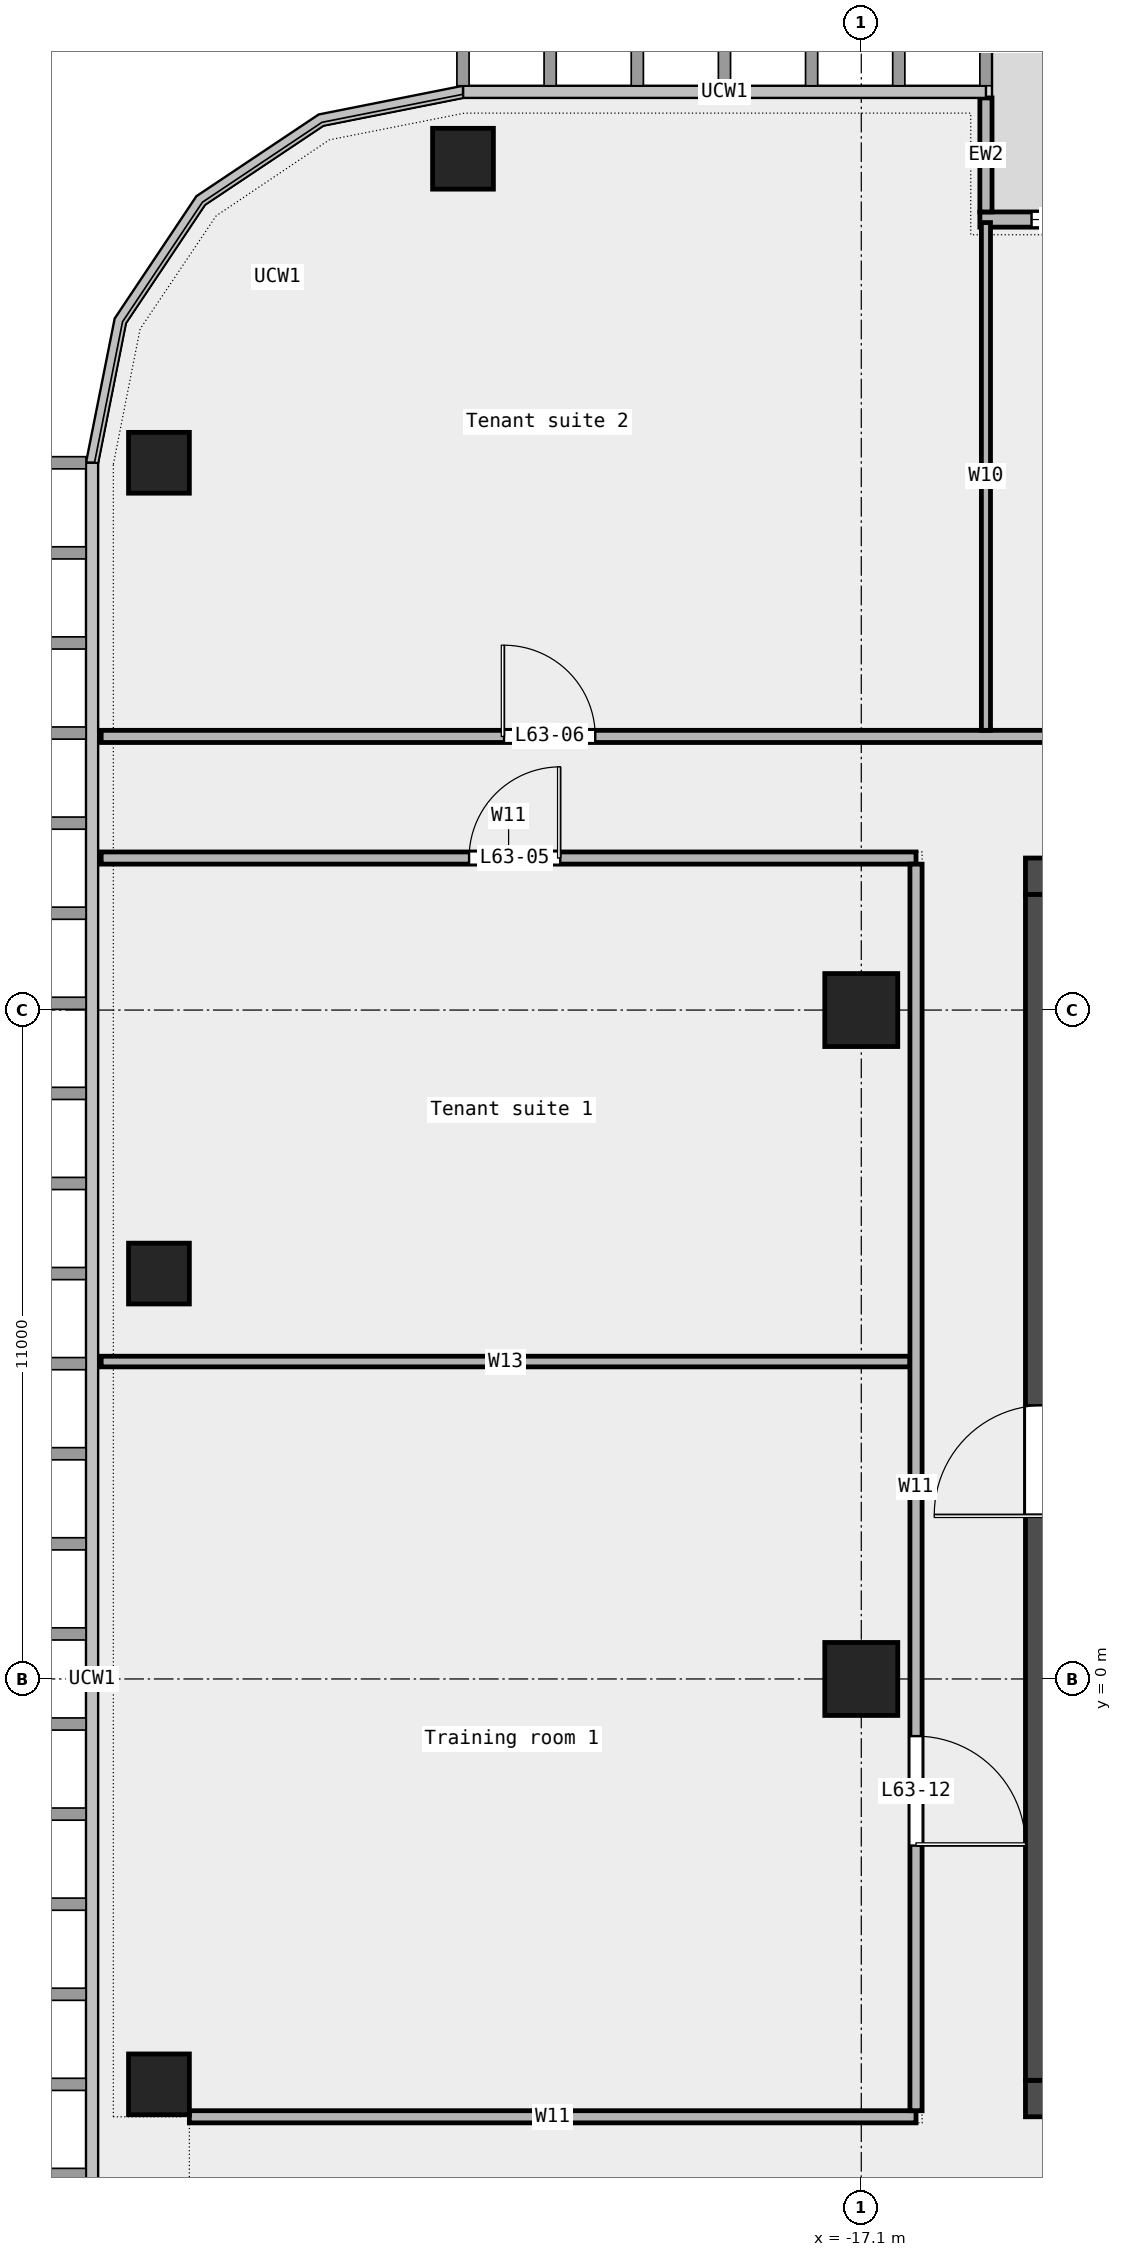
"""IFC4 building model, lengths in metres.
Left out: names, types, materials, properties, quantities, classifications, styles, units other than length and angle.
Written with IfcOpenShell. Run it as: python <this file> out.ifc"""

import sys

from ifc_helpers import new_model, si_unit, direction, frame, frame_2d, origin, origin_2d, place, context, subcontext, project, spatial, rectangle, extrude, element, fill, save


model = new_model("IFC4")
c1 = context("Model", 3, precision=1e-05, world=origin(), true_north=direction((0.0, 1.0)))
c2 = subcontext(c1, "Body", "Model", "MODEL_VIEW")
j1 = project(units=[si_unit("LENGTHUNIT", "METRE"), si_unit("PLANEANGLEUNIT", "RADIAN")], contexts=[c1])
p1 = place(None, origin())
s1 = spatial("IfcSite", under=j1, at=p1, CompositionType="ELEMENT")
p2 = place(p1, origin())
s2 = spatial("IfcBuilding", under=s1, at=p2, CompositionType="ELEMENT")
p3 = place(p2, frame((0.0, 0.0, 291.4)))
s3 = spatial("IfcBuildingStorey", under=s2, at=p3, CompositionType="ELEMENT", Elevation=291.4)
for number, where, z_axis, x_axis in (
    (1, (-23.65, 25.0, 0.0), (0.0, 0.0, 1.0), (1.0, 0.0, 0.0)),
    (2, (-28.65, 20.0, 0.0), (0.0, 0.0, 1.0), (1.0, 0.0, 0.0)),
    (3, (-28.65, 6.667, 0.0), (0.0, 0.0, 1.0), (1.0, 0.0, 0.0)),
    (4, (-28.65, -6.667, 0.0), (0.0, 0.0, 1.0), (1.0, 0.0, 0.0)),
):
    element("IfcColumn", number, at=place(p3, frame(where, z_axis=z_axis, x_axis=x_axis)), inside=s3, PredefinedType="COLUMN", context=c2, shape_type="SweptSolid", body=[
        extrude(rectangle(XDim=1.0, YDim=1.0, at=origin_2d()), origin(), (0.0, 0.0, 1.0), 3.6),
    ])
for number, where, z_axis, x_axis in (
    (5, (-17.1, 0.0, 0.0), (0.0, 0.0, 1.0), (1.0, 0.0, 0.0)),
    (6, (-17.1, 11.0, 0.0), (0.0, 0.0, 1.0), (1.0, 0.0, 0.0)),
):
    element("IfcColumn", number, at=place(p3, frame(where, z_axis=z_axis, x_axis=x_axis)), inside=s3, PredefinedType="COLUMN", context=c2, shape_type="SweptSolid", body=[
        extrude(rectangle(XDim=1.2, YDim=1.2, at=origin_2d()), origin(), (0.0, 0.0, 1.0), 3.6),
    ])
p4 = place(p3, frame((-2.05, 24.0, 0.0), z_axis=(0.0, 0.0, 1.0), x_axis=(-1.0, 0.0, 0.0)))
e7 = element("IfcWall", 7, at=p4, inside=s3, PredefinedType="STANDARD", context=c2, shape_type="SweptSolid", body=[
    extrude(rectangle(XDim=13.1, YDim=0.25, at=frame_2d((6.55, 0.0))), origin(), (0.0, 0.0, 1.0), 3.6),
])
p5 = place(p4, frame((1.5, 0.0, 0.45)))
e8 = element("IfcOpeningElement", 8, at=p5, cuts=e7, PredefinedType="OPENING", context=c2, shape_type="SweptSolid", body=[
    extrude(rectangle(XDim=1.5, YDim=2.4, at=frame_2d((0.75, 1.2))), frame((0.0, 0.137, 0.0), z_axis=(0.0, -1.0, 0.0), x_axis=(1.0, 0.0, 0.0)), (0.0, 0.0, 1.0), 0.274),
])
p6 = place(p4, frame((5.75, 0.0, 0.0)))
e9 = element("IfcOpeningElement", 9, at=p6, cuts=e7, PredefinedType="OPENING", context=c2, shape_type="SweptSolid", body=[
    extrude(rectangle(XDim=1.8, YDim=2.4, at=frame_2d((0.9, 1.2))), frame((0.0, 0.137, 0.0), z_axis=(0.0, -1.0, 0.0), x_axis=(1.0, 0.0, 0.0)), (0.0, 0.0, 1.0), 0.274),
])
p7 = place(p4, frame((10.75, 0.0, 0.45)))
e10 = element("IfcOpeningElement", 10, at=p7, cuts=e7, PredefinedType="OPENING", context=c2, shape_type="SweptSolid", body=[
    extrude(rectangle(XDim=1.5, YDim=2.4, at=frame_2d((0.75, 1.2))), frame((0.0, 0.137, 0.0), z_axis=(0.0, -1.0, 0.0), x_axis=(1.0, 0.0, 0.0)), (0.0, 0.0, 1.0), 0.274),
])
p8 = place(p3, frame((-15.05, 26.0, 0.0), z_axis=(0.0, 0.0, 1.0), x_axis=(0.0, -1.0, 0.0)))
e11 = element("IfcWall", 11, at=p8, inside=s3, PredefinedType="STANDARD", context=c2, shape_type="SweptSolid", body=[
    extrude(rectangle(XDim=1.875, YDim=0.2, at=frame_2d((0.938, 0.0))), origin(), (0.0, 0.0, 1.0), 3.6),
])
p9 = place(p3, frame((-28.15, -7.2, 0.0), z_axis=(0.0, 0.0, 1.0), x_axis=(1.0, 0.0, 0.0)))
e12 = element("IfcWall", 12, at=p9, inside=s3, PredefinedType="PARTITIONING", context=c2, shape_type="SweptSolid", body=[
    extrude(rectangle(XDim=11.95, YDim=0.2, at=frame_2d((5.975, 0.0))), origin(), (0.0, 0.0, 1.0), 3.6),
])
p10 = place(p3, frame((-29.6, 5.22, 0.0), z_axis=(0.0, 0.0, 1.0), x_axis=(1.0, 0.0, 0.0)))
e13 = element("IfcWall", 13, at=p10, inside=s3, PredefinedType="PARTITIONING", context=c2, shape_type="SweptSolid", body=[
    extrude(rectangle(XDim=13.3, YDim=0.175, at=frame_2d((6.65, 0.0))), origin(), (0.0, 0.0, 1.0), 3.6),
])
p11 = place(p3, frame((-29.6, 13.5, 0.0), z_axis=(0.0, 0.0, 1.0), x_axis=(1.0, 0.0, 0.0)))
e14 = element("IfcWall", 14, at=p11, inside=s3, PredefinedType="PARTITIONING", context=c2, shape_type="SweptSolid", body=[
    extrude(rectangle(XDim=13.4, YDim=0.2, at=frame_2d((6.7, 0.0))), origin(), (0.0, 0.0, 1.0), 3.6),
])
p12 = place(p11, frame((6.05, 0.0, 0.0)))
e15 = element("IfcOpeningElement", 15, at=p12, cuts=e14, PredefinedType="OPENING", context=c2, shape_type="SweptSolid", body=[
    extrude(rectangle(XDim=1.5, YDim=2.1, at=frame_2d((0.75, 1.05))), frame((0.0, 0.112, 0.0), z_axis=(0.0, -1.0, 0.0), x_axis=(1.0, 0.0, 0.0)), (0.0, 0.0, 1.0), 0.224),
])
p13 = place(p3, frame((-29.6, 15.5, 0.0), z_axis=(0.0, 0.0, 1.0), x_axis=(1.0, 0.0, 0.0)))
e16 = element("IfcWall", 16, at=p13, inside=s3, PredefinedType="PARTITIONING", context=c2, shape_type="SweptSolid", body=[
    extrude(rectangle(XDim=59.2, YDim=0.2, at=frame_2d((29.6, 0.0))), origin(), (0.0, 0.0, 1.0), 3.6),
])
p14 = place(p13, frame((48.3, 0.0, 0.0)))
e17 = element("IfcOpeningElement", 17, at=p14, cuts=e16, PredefinedType="OPENING", context=c2, shape_type="SweptSolid", body=[
    extrude(rectangle(XDim=1.8, YDim=2.1, at=frame_2d((0.9, 1.05))), frame((0.0, 0.112, 0.0), z_axis=(0.0, -1.0, 0.0), x_axis=(1.0, 0.0, 0.0)), (0.0, 0.0, 1.0), 0.224),
])
p15 = place(p13, frame((32.675, 0.0, 0.0)))
e18 = element("IfcOpeningElement", 18, at=p15, cuts=e16, PredefinedType="OPENING", context=c2, shape_type="SweptSolid", body=[
    extrude(rectangle(XDim=1.5, YDim=2.1, at=frame_2d((0.75, 1.05))), frame((0.0, 0.112, 0.0), z_axis=(0.0, -1.0, 0.0), x_axis=(1.0, 0.0, 0.0)), (0.0, 0.0, 1.0), 0.224),
])
p16 = place(p13, frame((6.625, 0.0, 0.0)))
e19 = element("IfcOpeningElement", 19, at=p16, cuts=e16, PredefinedType="OPENING", context=c2, shape_type="SweptSolid", body=[
    extrude(rectangle(XDim=1.5, YDim=2.1, at=frame_2d((0.75, 1.05))), frame((0.0, 0.112, 0.0), z_axis=(0.0, -1.0, 0.0), x_axis=(1.0, 0.0, 0.0)), (0.0, 0.0, 1.0), 0.224),
])
p17 = place(p13, frame((20.25, 0.0, 0.0)))
e20 = element("IfcOpeningElement", 20, at=p17, cuts=e16, PredefinedType="OPENING", context=c2, shape_type="SweptSolid", body=[
    extrude(rectangle(XDim=1.5, YDim=2.1, at=frame_2d((0.75, 1.05))), frame((0.0, 0.112, 0.0), z_axis=(0.0, -1.0, 0.0), x_axis=(1.0, 0.0, 0.0)), (0.0, 0.0, 1.0), 0.224),
])
p18 = place(p3, frame((-16.2, -7.1, 0.0), z_axis=(0.0, 0.0, 1.0), x_axis=(0.0, 1.0, 0.0)))
e21 = element("IfcWall", 21, at=p18, inside=s3, PredefinedType="PARTITIONING", context=c2, shape_type="SweptSolid", body=[
    extrude(rectangle(XDim=20.5, YDim=0.2, at=frame_2d((10.25, 0.0))), origin(), (0.0, 0.0, 1.0), 3.6),
])
p19 = place(p18, frame((4.36, 0.0, 0.0)))
e22 = element("IfcOpeningElement", 22, at=p19, cuts=e21, PredefinedType="OPENING", context=c2, shape_type="SweptSolid", body=[
    extrude(rectangle(XDim=1.8, YDim=2.1, at=frame_2d((0.9, 1.05))), frame((0.0, 0.112, 0.0), z_axis=(0.0, -1.0, 0.0), x_axis=(1.0, 0.0, 0.0)), (0.0, 0.0, 1.0), 0.224),
])
p20 = place(p3, frame((-15.05, 15.6, 0.0), z_axis=(0.0, 0.0, 1.0), x_axis=(0.0, 1.0, 0.0)))
e23 = element("IfcWall", 23, at=p20, inside=s3, PredefinedType="PARTITIONING", context=c2, shape_type="SweptSolid", body=[
    extrude(rectangle(XDim=8.35, YDim=0.15, at=frame_2d((4.175, 0.0))), origin(), (0.0, 0.0, 1.0), 3.6),
])
p21 = place(p3, frame((-14.4, -6.9, 0.0), z_axis=(0.0, 0.0, 1.0), x_axis=(1.0, 0.0, 0.0)))
e24 = element("IfcWall", 24, at=p21, inside=s3, PredefinedType="SHEAR", context=c2, shape_type="SweptSolid", body=[
    extrude(rectangle(XDim=28.8, YDim=0.6, at=frame_2d((14.4, 0.0))), origin(), (0.0, 0.0, 1.0), 3.7),
])
p22 = place(p21, frame((4.712, 0.0, 0.0)))
e25 = element("IfcOpeningElement", 25, at=p22, cuts=e24, PredefinedType="OPENING", context=c2, shape_type="SweptSolid", body=[
    extrude(rectangle(XDim=1.0, YDim=2.1, at=frame_2d((0.5, 1.05))), frame((0.0, 0.312, 0.0), z_axis=(0.0, -1.0, 0.0), x_axis=(1.0, 0.0, 0.0)), (0.0, 0.0, 1.0), 0.624),
])
p23 = place(p21, frame((9.675, 0.0, 0.0)))
e26 = element("IfcOpeningElement", 26, at=p23, cuts=e24, PredefinedType="OPENING", context=c2, shape_type="SweptSolid", body=[
    extrude(rectangle(XDim=1.2, YDim=2.1, at=frame_2d((0.6, 1.05))), frame((0.0, 0.312, 0.0), z_axis=(0.0, -1.0, 0.0), x_axis=(1.0, 0.0, 0.0)), (0.0, 0.0, 1.0), 0.624),
])
p24 = place(p21, frame((15.025, 0.0, 0.0)))
e27 = element("IfcOpeningElement", 27, at=p24, cuts=e24, PredefinedType="OPENING", context=c2, shape_type="SweptSolid", body=[
    extrude(rectangle(XDim=1.0, YDim=2.1, at=frame_2d((0.5, 1.05))), frame((0.0, 0.312, 0.0), z_axis=(0.0, -1.0, 0.0), x_axis=(1.0, 0.0, 0.0)), (0.0, 0.0, 1.0), 0.624),
])
p25 = place(p21, frame((18.75, 0.0, 0.0)))
e28 = element("IfcOpeningElement", 28, at=p25, cuts=e24, PredefinedType="OPENING", context=c2, shape_type="SweptSolid", body=[
    extrude(rectangle(XDim=1.8, YDim=2.1, at=frame_2d((0.9, 1.05))), frame((0.0, 0.312, 0.0), z_axis=(0.0, -1.0, 0.0), x_axis=(1.0, 0.0, 0.0)), (0.0, 0.0, 1.0), 0.624),
])
p26 = place(p21, frame((23.087, 0.0, 0.0)))
e29 = element("IfcOpeningElement", 29, at=p26, cuts=e24, PredefinedType="OPENING", context=c2, shape_type="SweptSolid", body=[
    extrude(rectangle(XDim=1.0, YDim=2.1, at=frame_2d((0.5, 1.05))), frame((0.0, 0.312, 0.0), z_axis=(0.0, -1.0, 0.0), x_axis=(1.0, 0.0, 0.0)), (0.0, 0.0, 1.0), 0.624),
])
p27 = place(p3, frame((-14.4, 13.2, 0.0), z_axis=(0.0, 0.0, 1.0), x_axis=(1.0, 0.0, 0.0)))
e30 = element("IfcWall", 30, at=p27, inside=s3, PredefinedType="SHEAR", context=c2, shape_type="SweptSolid", body=[
    extrude(rectangle(XDim=28.8, YDim=0.6, at=frame_2d((14.4, 0.0))), origin(), (0.0, 0.0, 1.0), 3.7),
])
p28 = place(p27, frame((6.3, 0.0, 0.0)))
e31 = element("IfcOpeningElement", 31, at=p28, cuts=e30, PredefinedType="OPENING", context=c2, shape_type="SweptSolid", body=[
    extrude(rectangle(XDim=1.2, YDim=2.1, at=frame_2d((0.6, 1.05))), frame((0.0, 0.312, 0.0), z_axis=(0.0, -1.0, 0.0), x_axis=(1.0, 0.0, 0.0)), (0.0, 0.0, 1.0), 0.624),
])
p29 = place(p27, frame((21.3, 0.0, 0.0)))
e32 = element("IfcOpeningElement", 32, at=p29, cuts=e30, PredefinedType="OPENING", context=c2, shape_type="SweptSolid", body=[
    extrude(rectangle(XDim=1.2, YDim=2.1, at=frame_2d((0.6, 1.05))), frame((0.0, 0.312, 0.0), z_axis=(0.0, -1.0, 0.0), x_axis=(1.0, 0.0, 0.0)), (0.0, 0.0, 1.0), 0.624),
])
p30 = place(p3, frame((-14.1, -6.6, 0.0), z_axis=(0.0, 0.0, 1.0), x_axis=(0.0, 1.0, 0.0)))
e33 = element("IfcWall", 33, at=p30, inside=s3, PredefinedType="SHEAR", context=c2, shape_type="SweptSolid", body=[
    extrude(rectangle(XDim=19.5, YDim=0.6, at=frame_2d((9.75, 0.0))), origin(), (0.0, 0.0, 1.0), 3.7),
])
p31 = place(p30, frame((9.3, 0.0, 0.0)))
e34 = element("IfcOpeningElement", 34, at=p31, cuts=e33, PredefinedType="OPENING", context=c2, shape_type="SweptSolid", body=[
    extrude(rectangle(XDim=1.8, YDim=2.1, at=frame_2d((0.9, 1.05))), frame((0.0, 0.312, 0.0), z_axis=(0.0, -1.0, 0.0), x_axis=(1.0, 0.0, 0.0)), (0.0, 0.0, 1.0), 0.624),
])
p32 = place(p7, origin())
e35 = element("IfcWindow", 35, at=p32, inside=s3, PartitioningType="SINGLE_PANEL", PredefinedType="WINDOW", context=c2, shape_type="SweptSolid", body=[
    extrude(rectangle(XDim=1.5, YDim=2.4, at=frame_2d((0.75, 1.2))), frame((0.0, 0.03, 0.0), z_axis=(0.0, -1.0, 0.0), x_axis=(1.0, 0.0, 0.0)), (0.0, 0.0, 1.0), 0.06),
])
fill(e10, e35)
p33 = place(p12, origin())
e36 = element("IfcDoor", 36, at=p33, inside=s3, OperationType="DOUBLE_DOOR_SINGLE_SWING", PredefinedType="DOOR", context=c2, shape_type="SweptSolid", body=[
    extrude(rectangle(XDim=1.5, YDim=2.1, at=frame_2d((0.75, 1.05))), frame((0.0, 0.025, 0.0), z_axis=(0.0, -1.0, 0.0), x_axis=(1.0, 0.0, 0.0)), (0.0, 0.0, 1.0), 0.05),
])
fill(e15, e36)
p34 = place(p16, origin())
e37 = element("IfcDoor", 37, at=p34, inside=s3, OperationType="DOUBLE_DOOR_SINGLE_SWING", PredefinedType="DOOR", context=c2, shape_type="SweptSolid", body=[
    extrude(rectangle(XDim=1.5, YDim=2.1, at=frame_2d((0.75, 1.05))), frame((0.0, 0.025, 0.0), z_axis=(0.0, -1.0, 0.0), x_axis=(1.0, 0.0, 0.0)), (0.0, 0.0, 1.0), 0.05),
])
fill(e19, e37)
p35 = place(p19, origin())
e38 = element("IfcDoor", 38, at=p35, inside=s3, OperationType="DOUBLE_DOOR_SINGLE_SWING", PredefinedType="DOOR", context=c2, shape_type="SweptSolid", body=[
    extrude(rectangle(XDim=1.8, YDim=2.1, at=frame_2d((0.9, 1.05))), frame((0.0, 0.025, 0.0), z_axis=(0.0, -1.0, 0.0), x_axis=(1.0, 0.0, 0.0)), (0.0, 0.0, 1.0), 0.05),
])
fill(e22, e38)
save(model, sys.argv[1])
